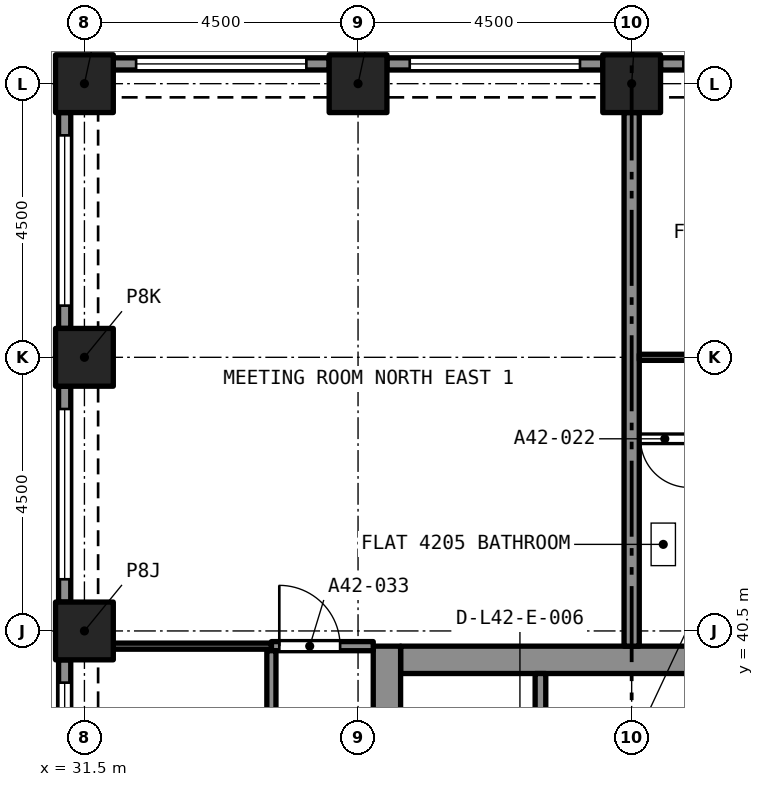
"""IFC4 building model, lengths in metres.
Left out: names, types, materials, properties, quantities, classifications, styles, units other than length and angle.
Written with IfcOpenShell. Run it as: python <this file> out.ifc"""

import sys

from ifc_helpers import new_model, si_unit, direction, frame, frame_2d, origin, origin_2d, place, context, subcontext, project, spatial, rectangle, extrude, element, fill, save


model = new_model("IFC4")
c1 = context("Model", 3, precision=1e-05, world=origin(), true_north=direction((0.0, 1.0)))
c2 = subcontext(c1, "Body", "Model", "MODEL_VIEW")
j1 = project(units=[si_unit("LENGTHUNIT", "METRE"), si_unit("PLANEANGLEUNIT", "RADIAN")], contexts=[c1])
p1 = place(None, origin())
s1 = spatial("IfcSite", under=j1, at=p1, CompositionType="ELEMENT")
p2 = place(p1, origin())
s2 = spatial("IfcBuilding", under=s1, at=p2, CompositionType="ELEMENT")
p3 = place(p2, frame((0.0, 0.0, 150.6)))
s3 = spatial("IfcBuildingStorey", under=s2, at=p3, CompositionType="ELEMENT", Elevation=150.6)
for number, where, z_axis, x_axis in (
    (1, (31.5, 40.5, 0.0), (0.0, 0.0, 1.0), (1.0, 0.0, 0.0)),
    (2, (31.5, 45.0, 0.0), (0.0, 0.0, 1.0), (1.0, 0.0, 0.0)),
    (3, (31.5, 49.5, 0.0), (0.0, 0.0, 1.0), (1.0, 0.0, 0.0)),
    (4, (36.0, 49.5, 0.0), (0.0, 0.0, 1.0), (1.0, 0.0, 0.0)),
    (5, (40.5, 49.5, 0.0), (0.0, 0.0, 1.0), (1.0, 0.0, 0.0)),
):
    element("IfcColumn", number, at=place(p3, frame(where, z_axis=z_axis, x_axis=x_axis)), inside=s3, PredefinedType="COLUMN", context=c2, shape_type="SweptSolid", body=[
        extrude(rectangle(XDim=0.95, YDim=0.95, at=origin_2d()), origin(), (0.0, 0.0, 1.0), 4.4),
    ])
p4 = place(p3, frame((36.7, 40.025, 0.0), z_axis=(0.0, 0.0, 1.0), x_axis=(1.0, 0.0, 0.0)))
e6 = element("IfcWall", 6, at=p4, inside=s3, PredefinedType="SOLIDWALL", context=c2, shape_type="SweptSolid", body=[
    extrude(rectangle(XDim=7.6, YDim=0.45, at=frame_2d((3.8, 0.0))), origin(), (0.0, 0.0, 1.0), 4.4),
])
p5 = place(p3, frame((36.475, 27.25, 0.0), z_axis=(0.0, 0.0, 1.0), x_axis=(0.0, 1.0, 0.0)))
e7 = element("IfcWall", 7, at=p5, inside=s3, PredefinedType="SOLIDWALL", context=c2, shape_type="SweptSolid", body=[
    extrude(rectangle(XDim=13.0, YDim=0.45, at=frame_2d((6.5, 0.0))), origin(), (0.0, 0.0, 1.0), 4.4),
])
p6 = place(p5, frame((8.7, 0.0, 0.0)))
e8 = element("IfcOpeningElement", 8, at=p6, cuts=e7, PredefinedType="OPENING", context=c2, shape_type="SweptSolid", body=[
    extrude(rectangle(XDim=1.2, YDim=2.1, at=frame_2d((0.6, 1.05))), frame((0.0, 0.235, 0.0), z_axis=(0.0, -1.0, 0.0), x_axis=(1.0, 0.0, 0.0)), (0.0, 0.0, 1.0), 0.47),
])
p7 = place(p3, frame((40.975, 49.825, 0.0), z_axis=(0.0, 0.0, 1.0), x_axis=(1.0, 0.0, 0.0)))
e9 = element("IfcWall", 9, at=p7, inside=s3, PredefinedType="SOLIDWALL", context=c2, shape_type="SweptSolid", body=[
    extrude(rectangle(XDim=3.55, YDim=0.2, at=frame_2d((1.775, 0.0))), origin(), (0.0, 0.0, 1.0), 4.4),
])
p8 = place(p7, frame((0.375, 0.0, 0.45)))
e10 = element("IfcOpeningElement", 10, at=p8, cuts=e9, PredefinedType="OPENING", context=c2, shape_type="SweptSolid", body=[
    extrude(rectangle(XDim=2.8, YDim=2.55, at=frame_2d((1.4, 1.275))), frame((0.0, 0.11, 0.0), z_axis=(0.0, -1.0, 0.0), x_axis=(1.0, 0.0, 0.0)), (0.0, 0.0, 1.0), 0.22),
])
p9 = place(p3, frame((36.475, 49.825, 0.0), z_axis=(0.0, 0.0, 1.0), x_axis=(1.0, 0.0, 0.0)))
e11 = element("IfcWall", 11, at=p9, inside=s3, PredefinedType="SOLIDWALL", context=c2, shape_type="SweptSolid", body=[
    extrude(rectangle(XDim=3.55, YDim=0.2, at=frame_2d((1.775, 0.0))), origin(), (0.0, 0.0, 1.0), 4.4),
])
p10 = place(p9, frame((0.375, 0.0, 0.45)))
e12 = element("IfcOpeningElement", 12, at=p10, cuts=e11, PredefinedType="OPENING", context=c2, shape_type="SweptSolid", body=[
    extrude(rectangle(XDim=2.8, YDim=2.55, at=frame_2d((1.4, 1.275))), frame((0.0, 0.11, 0.0), z_axis=(0.0, -1.0, 0.0), x_axis=(1.0, 0.0, 0.0)), (0.0, 0.0, 1.0), 0.22),
])
p11 = place(p3, frame((31.975, 49.825, 0.0), z_axis=(0.0, 0.0, 1.0), x_axis=(1.0, 0.0, 0.0)))
e13 = element("IfcWall", 13, at=p11, inside=s3, PredefinedType="SOLIDWALL", context=c2, shape_type="SweptSolid", body=[
    extrude(rectangle(XDim=3.55, YDim=0.2, at=frame_2d((1.775, 0.0))), origin(), (0.0, 0.0, 1.0), 4.4),
])
p12 = place(p11, frame((0.375, 0.0, 0.45)))
e14 = element("IfcOpeningElement", 14, at=p12, cuts=e13, PredefinedType="OPENING", context=c2, shape_type="SweptSolid", body=[
    extrude(rectangle(XDim=2.8, YDim=2.55, at=frame_2d((1.4, 1.275))), frame((0.0, 0.11, 0.0), z_axis=(0.0, -1.0, 0.0), x_axis=(1.0, 0.0, 0.0)), (0.0, 0.0, 1.0), 0.22),
])
p13 = place(p3, frame((31.175, 45.475, 0.0), z_axis=(0.0, 0.0, 1.0), x_axis=(0.0, 1.0, 0.0)))
e15 = element("IfcWall", 15, at=p13, inside=s3, PredefinedType="SOLIDWALL", context=c2, shape_type="SweptSolid", body=[
    extrude(rectangle(XDim=3.55, YDim=0.2, at=frame_2d((1.775, 0.0))), origin(), (0.0, 0.0, 1.0), 4.4),
])
p14 = place(p13, frame((0.375, 0.0, 0.45)))
e16 = element("IfcOpeningElement", 16, at=p14, cuts=e15, PredefinedType="OPENING", context=c2, shape_type="SweptSolid", body=[
    extrude(rectangle(XDim=2.8, YDim=2.55, at=frame_2d((1.4, 1.275))), frame((0.0, 0.11, 0.0), z_axis=(0.0, -1.0, 0.0), x_axis=(1.0, 0.0, 0.0)), (0.0, 0.0, 1.0), 0.22),
])
p15 = place(p3, frame((31.175, 40.975, 0.0), z_axis=(0.0, 0.0, 1.0), x_axis=(0.0, 1.0, 0.0)))
e17 = element("IfcWall", 17, at=p15, inside=s3, PredefinedType="SOLIDWALL", context=c2, shape_type="SweptSolid", body=[
    extrude(rectangle(XDim=3.55, YDim=0.2, at=frame_2d((1.775, 0.0))), origin(), (0.0, 0.0, 1.0), 4.4),
])
p16 = place(p15, frame((0.375, 0.0, 0.45)))
e18 = element("IfcOpeningElement", 18, at=p16, cuts=e17, PredefinedType="OPENING", context=c2, shape_type="SweptSolid", body=[
    extrude(rectangle(XDim=2.8, YDim=2.55, at=frame_2d((1.4, 1.275))), frame((0.0, 0.11, 0.0), z_axis=(0.0, -1.0, 0.0), x_axis=(1.0, 0.0, 0.0)), (0.0, 0.0, 1.0), 0.22),
])
p17 = place(p3, frame((31.175, 36.475, 0.0), z_axis=(0.0, 0.0, 1.0), x_axis=(0.0, 1.0, 0.0)))
e19 = element("IfcWall", 19, at=p17, inside=s3, PredefinedType="SOLIDWALL", context=c2, shape_type="SweptSolid", body=[
    extrude(rectangle(XDim=3.55, YDim=0.2, at=frame_2d((1.775, 0.0))), origin(), (0.0, 0.0, 1.0), 4.4),
])
p18 = place(p17, frame((0.375, 0.0, 0.45)))
e20 = element("IfcOpeningElement", 20, at=p18, cuts=e19, PredefinedType="OPENING", context=c2, shape_type="SweptSolid", body=[
    extrude(rectangle(XDim=2.8, YDim=2.55, at=frame_2d((1.4, 1.275))), frame((0.0, 0.11, 0.0), z_axis=(0.0, -1.0, 0.0), x_axis=(1.0, 0.0, 0.0)), (0.0, 0.0, 1.0), 0.22),
])
p19 = place(p3, frame((41.477, 43.66, 0.0), z_axis=(0.0, 0.0, 1.0), x_axis=(-1.0, 0.0, 0.0)))
e21 = element("IfcWall", 21, at=p19, inside=s3, PredefinedType="PARTITIONING", context=c2, shape_type="SweptSolid", body=[
    extrude(rectangle(XDim=0.852, YDim=0.125, at=frame_2d((0.426, 0.0))), origin(), (0.0, 0.0, 1.0), 4.1),
])
p20 = place(p19, frame((0.032, 0.0, 0.0)))
e22 = element("IfcOpeningElement", 22, at=p20, cuts=e21, PredefinedType="OPENING", context=c2, shape_type="SweptSolid", body=[
    extrude(rectangle(XDim=0.8, YDim=2.1, at=frame_2d((0.4, 1.05))), frame((0.0, 0.073, 0.0), z_axis=(0.0, -1.0, 0.0), x_axis=(1.0, 0.0, 0.0)), (0.0, 0.0, 1.0), 0.145),
])
p21 = place(p3, frame((40.5, 40.25, 0.0), z_axis=(0.0, 0.0, 1.0), x_axis=(0.0, 1.0, 0.0)))
e23 = element("IfcWall", 23, at=p21, inside=s3, PredefinedType="PARTITIONING", context=c2, shape_type="SweptSolid", body=[
    extrude(rectangle(XDim=8.775, YDim=0.25, at=frame_2d((4.387, 0.0))), origin(), (0.0, 0.0, 1.0), 4.1),
])
p22 = place(p3, frame((40.625, 45.0, 0.0), z_axis=(0.0, 0.0, 1.0), x_axis=(1.0, 0.0, 0.0)))
e24 = element("IfcWall", 24, at=p22, inside=s3, PredefinedType="PARTITIONING", context=c2, shape_type="SweptSolid", body=[
    extrude(rectangle(XDim=4.375, YDim=0.1, at=frame_2d((2.188, 0.0))), origin(), (0.0, 0.0, 1.0), 4.1),
])
p23 = place(p22, frame((1.675, 0.0, 0.0)))
e25 = element("IfcOpeningElement", 25, at=p23, cuts=e24, PredefinedType="OPENING", context=c2, shape_type="SweptSolid", body=[
    extrude(rectangle(XDim=0.9, YDim=2.1, at=frame_2d((0.45, 1.05))), frame((0.0, 0.06, 0.0), z_axis=(0.0, -1.0, 0.0), x_axis=(1.0, 0.0, 0.0)), (0.0, 0.0, 1.0), 0.12),
])
p24 = place(p3, frame((34.575, 40.25, 0.0), z_axis=(0.0, 0.0, 1.0), x_axis=(1.0, 0.0, 0.0)))
e26 = element("IfcWall", 26, at=p24, inside=s3, PredefinedType="PARTITIONING", context=c2, shape_type="SweptSolid", body=[
    extrude(rectangle(XDim=1.675, YDim=0.15, at=frame_2d((0.837, 0.0))), origin(), (0.0, 0.0, 1.0), 4.1),
])
p25 = place(p24, frame((0.13, 0.0, 0.0)))
e27 = element("IfcOpeningElement", 27, at=p25, cuts=e26, PredefinedType="OPENING", context=c2, shape_type="SweptSolid", body=[
    extrude(rectangle(XDim=1.0, YDim=2.1, at=frame_2d((0.5, 1.05))), frame((0.0, 0.085, 0.0), z_axis=(0.0, -1.0, 0.0), x_axis=(1.0, 0.0, 0.0)), (0.0, 0.0, 1.0), 0.17),
])
p26 = place(p3, frame((31.975, 40.25, 0.0), z_axis=(0.0, 0.0, 1.0), x_axis=(1.0, 0.0, 0.0)))
e28 = element("IfcWall", 28, at=p26, inside=s3, PredefinedType="PARTITIONING", context=c2, shape_type="SweptSolid", body=[
    extrude(rectangle(XDim=2.6, YDim=0.1, at=frame_2d((1.3, 0.0))), origin(), (0.0, 0.0, 1.0), 4.1),
])
p27 = place(p3, frame((34.575, 31.5, 0.0), z_axis=(0.0, 0.0, 1.0), x_axis=(0.0, 1.0, 0.0)))
e29 = element("IfcWall", 29, at=p27, inside=s3, PredefinedType="PARTITIONING", context=c2, shape_type="SweptSolid", body=[
    extrude(rectangle(XDim=8.675, YDim=0.15, at=frame_2d((4.337, 0.0))), origin(), (0.0, 0.0, 1.0), 4.1),
])
p28 = place(p27, frame((3.875, 0.0, 0.0)))
e30 = element("IfcOpeningElement", 30, at=p28, cuts=e29, PredefinedType="OPENING", context=c2, shape_type="SweptSolid", body=[
    extrude(rectangle(XDim=1.0, YDim=2.1, at=frame_2d((0.5, 1.05))), frame((0.0, 0.085, 0.0), z_axis=(0.0, -1.0, 0.0), x_axis=(1.0, 0.0, 0.0)), (0.0, 0.0, 1.0), 0.17),
])
p29 = place(p3, frame((39.0, 37.5, 0.0), z_axis=(0.0, 0.0, 1.0), x_axis=(0.0, 1.0, 0.0)))
e31 = element("IfcWall", 31, at=p29, inside=s3, PredefinedType="SOLIDWALL", context=c2, shape_type="SweptSolid", body=[
    extrude(rectangle(XDim=2.3, YDim=0.175, at=frame_2d((1.15, 0.0))), origin(), (0.0, 0.0, 1.0), 4.1),
])
p30 = place(p8, origin())
e32 = element("IfcWindow", 32, at=p30, inside=s3, PartitioningType="SINGLE_PANEL", PredefinedType="WINDOW", context=c2, shape_type="SweptSolid", body=[
    extrude(rectangle(XDim=2.8, YDim=2.55, at=frame_2d((1.4, 1.275))), frame((0.0, 0.03, 0.0), z_axis=(0.0, -1.0, 0.0), x_axis=(1.0, 0.0, 0.0)), (0.0, 0.0, 1.0), 0.06),
])
fill(e10, e32)
p31 = place(p10, origin())
e33 = element("IfcWindow", 33, at=p31, inside=s3, PartitioningType="SINGLE_PANEL", PredefinedType="WINDOW", context=c2, shape_type="SweptSolid", body=[
    extrude(rectangle(XDim=2.8, YDim=2.55, at=frame_2d((1.4, 1.275))), frame((0.0, 0.03, 0.0), z_axis=(0.0, -1.0, 0.0), x_axis=(1.0, 0.0, 0.0)), (0.0, 0.0, 1.0), 0.06),
])
fill(e12, e33)
p32 = place(p12, origin())
e34 = element("IfcWindow", 34, at=p32, inside=s3, PartitioningType="SINGLE_PANEL", PredefinedType="WINDOW", context=c2, shape_type="SweptSolid", body=[
    extrude(rectangle(XDim=2.8, YDim=2.55, at=frame_2d((1.4, 1.275))), frame((0.0, 0.03, 0.0), z_axis=(0.0, -1.0, 0.0), x_axis=(1.0, 0.0, 0.0)), (0.0, 0.0, 1.0), 0.06),
])
fill(e14, e34)
p33 = place(p14, origin())
e35 = element("IfcWindow", 35, at=p33, inside=s3, PartitioningType="SINGLE_PANEL", PredefinedType="WINDOW", context=c2, shape_type="SweptSolid", body=[
    extrude(rectangle(XDim=2.8, YDim=2.55, at=frame_2d((1.4, 1.275))), frame((0.0, 0.03, 0.0), z_axis=(0.0, -1.0, 0.0), x_axis=(1.0, 0.0, 0.0)), (0.0, 0.0, 1.0), 0.06),
])
fill(e16, e35)
p34 = place(p16, origin())
e36 = element("IfcWindow", 36, at=p34, inside=s3, PartitioningType="SINGLE_PANEL", PredefinedType="WINDOW", context=c2, shape_type="SweptSolid", body=[
    extrude(rectangle(XDim=2.8, YDim=2.55, at=frame_2d((1.4, 1.275))), frame((0.0, 0.03, 0.0), z_axis=(0.0, -1.0, 0.0), x_axis=(1.0, 0.0, 0.0)), (0.0, 0.0, 1.0), 0.06),
])
fill(e18, e36)
p35 = place(p18, origin())
e37 = element("IfcWindow", 37, at=p35, inside=s3, PartitioningType="SINGLE_PANEL", PredefinedType="WINDOW", context=c2, shape_type="SweptSolid", body=[
    extrude(rectangle(XDim=2.8, YDim=2.55, at=frame_2d((1.4, 1.275))), frame((0.0, 0.03, 0.0), z_axis=(0.0, -1.0, 0.0), x_axis=(1.0, 0.0, 0.0)), (0.0, 0.0, 1.0), 0.06),
])
fill(e20, e37)
p36 = place(p20, origin())
e38 = element("IfcDoor", 38, at=p36, inside=s3, OperationType="SINGLE_SWING_RIGHT", PredefinedType="DOOR", context=c2, shape_type="SweptSolid", body=[
    extrude(rectangle(XDim=0.8, YDim=2.1, at=frame_2d((0.4, 1.05))), frame((0.0, 0.025, 0.0), z_axis=(0.0, -1.0, 0.0), x_axis=(1.0, 0.0, 0.0)), (0.0, 0.0, 1.0), 0.05),
])
fill(e22, e38)
p37 = place(p25, origin())
e39 = element("IfcDoor", 39, at=p37, inside=s3, OperationType="SINGLE_SWING_LEFT", PredefinedType="DOOR", context=c2, shape_type="SweptSolid", body=[
    extrude(rectangle(XDim=1.0, YDim=2.1, at=frame_2d((0.5, 1.05))), frame((0.0, 0.025, 0.0), z_axis=(0.0, -1.0, 0.0), x_axis=(1.0, 0.0, 0.0)), (0.0, 0.0, 1.0), 0.05),
])
fill(e27, e39)
save(model, sys.argv[1])
